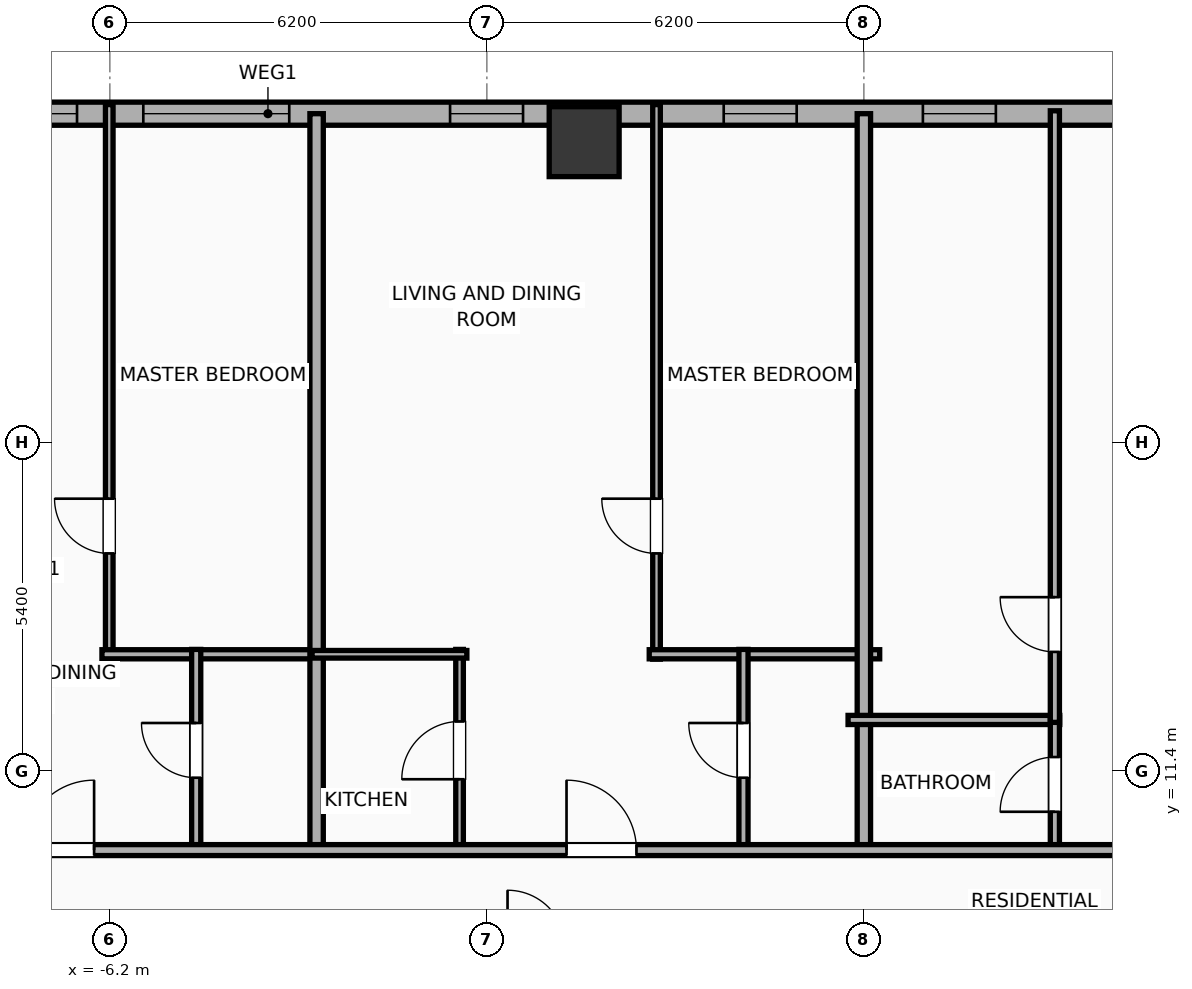
"""IFC4 building model, lengths in metres.
Left out: names, types, materials, properties, quantities, classifications, styles, units other than length and angle.
Written with IfcOpenShell. Run it as: python <this file> out.ifc"""

import sys

from ifc_helpers import new_model, si_unit, direction, frame, frame_2d, origin, origin_2d, place, context, subcontext, project, spatial, rectangle, hollow_rectangle, extrude, element, fill, save


model = new_model("IFC4")
c1 = context("Model", 3, precision=1e-05, world=origin(), true_north=direction((0.0, 1.0)))
c2 = subcontext(c1, "Body", "Model", "MODEL_VIEW")
j1 = project(units=[si_unit("LENGTHUNIT", "METRE"), si_unit("PLANEANGLEUNIT", "RADIAN")], contexts=[c1])
p1 = place(None, origin())
s1 = spatial("IfcSite", under=j1, at=p1, CompositionType="ELEMENT")
p2 = place(p1, origin())
s2 = spatial("IfcBuilding", under=s1, at=p2, CompositionType="ELEMENT")
p3 = place(p2, frame((0.0, 0.0, 33.8)))
s3 = spatial("IfcBuildingStorey", under=s2, at=p3, CompositionType="ELEMENT", Elevation=33.8)
p4 = place(p3, frame((1.6, 21.75, 0.0), z_axis=(0.0, 0.0, 1.0), x_axis=(1.0, 0.0, 0.0)))
e1 = element("IfcColumn", 1, at=p4, inside=s3, PredefinedType="COLUMN", context=c2, shape_type="SweptSolid", body=[
    extrude(hollow_rectangle(XDim=1.15, YDim=1.15, WallThickness=0.04, at=origin_2d()), origin(), (0.0, 0.0, 1.0), 3.9),
])
p5 = place(p3, frame((-29.581, 22.21, 0.0), z_axis=(0.0, 0.0, 1.0), x_axis=(1.0, 0.0, 0.0)))
e2 = element("IfcWall", 2, at=p5, inside=s3, PredefinedType="ELEMENTEDWALL", context=c2, shape_type="SweptSolid", body=[
    extrude(rectangle(XDim=51.963, YDim=0.38, at=frame_2d((25.981, 0.0))), origin(), (0.0, 0.0, 1.0), 3.65),
])
p6 = place(p5, frame((5.81, 0.0, 0.75)))
e3 = element("IfcOpeningElement", 3, at=p6, cuts=e2, PredefinedType="OPENING", context=c2, shape_type="SweptSolid", body=[
    extrude(rectangle(XDim=2.4, YDim=2.1, at=frame_2d((1.2, 1.05))), frame((0.0, 0.2, 0.0), z_axis=(0.0, -1.0, 0.0), x_axis=(1.0, 0.0, 0.0)), (0.0, 0.0, 1.0), 0.4),
])
p7 = place(p5, frame((23.931, 0.0, 0.75)))
e4 = element("IfcOpeningElement", 4, at=p7, cuts=e2, PredefinedType="OPENING", context=c2, shape_type="SweptSolid", body=[
    extrude(rectangle(XDim=2.4, YDim=2.1, at=frame_2d((1.2, 1.05))), frame((0.0, 0.2, 0.0), z_axis=(0.0, -1.0, 0.0), x_axis=(1.0, 0.0, 0.0)), (0.0, 0.0, 1.0), 0.4),
])
p8 = place(p5, frame((3.056, 0.0, 0.75)))
e5 = element("IfcOpeningElement", 5, at=p8, cuts=e2, PredefinedType="OPENING", context=c2, shape_type="SweptSolid", body=[
    extrude(rectangle(XDim=1.2, YDim=2.05, at=frame_2d((0.6, 1.025))), frame((0.0, 0.2, 0.0), z_axis=(0.0, -1.0, 0.0), x_axis=(1.0, 0.0, 0.0)), (0.0, 0.0, 1.0), 0.4),
])
p9 = place(p5, frame((11.127, 0.0, 0.75)))
e6 = element("IfcOpeningElement", 6, at=p9, cuts=e2, PredefinedType="OPENING", context=c2, shape_type="SweptSolid", body=[
    extrude(rectangle(XDim=0.52, YDim=2.05, at=frame_2d((0.26, 1.025))), frame((0.0, 0.2, 0.0), z_axis=(0.0, -1.0, 0.0), x_axis=(1.0, 0.0, 0.0)), (0.0, 0.0, 1.0), 0.4),
])
p10 = place(p5, frame((14.327, 0.0, 0.75)))
e7 = element("IfcOpeningElement", 7, at=p10, cuts=e2, PredefinedType="OPENING", context=c2, shape_type="SweptSolid", body=[
    extrude(rectangle(XDim=1.2, YDim=2.05, at=frame_2d((0.6, 1.025))), frame((0.0, 0.2, 0.0), z_axis=(0.0, -1.0, 0.0), x_axis=(1.0, 0.0, 0.0)), (0.0, 0.0, 1.0), 0.4),
])
p11 = place(p5, frame((21.641, 0.0, 0.75)))
e8 = element("IfcOpeningElement", 8, at=p11, cuts=e2, PredefinedType="OPENING", context=c2, shape_type="SweptSolid", body=[
    extrude(rectangle(XDim=1.2, YDim=2.05, at=frame_2d((0.6, 1.025))), frame((0.0, 0.2, 0.0), z_axis=(0.0, -1.0, 0.0), x_axis=(1.0, 0.0, 0.0)), (0.0, 0.0, 1.0), 0.4),
])
p12 = place(p5, frame((18.486, 0.0, 0.75)))
e9 = element("IfcOpeningElement", 9, at=p12, cuts=e2, PredefinedType="OPENING", context=c2, shape_type="SweptSolid", body=[
    extrude(rectangle(XDim=1.2, YDim=2.05, at=frame_2d((0.6, 1.025))), frame((0.0, 0.2, 0.0), z_axis=(0.0, -1.0, 0.0), x_axis=(1.0, 0.0, 0.0)), (0.0, 0.0, 1.0), 0.4),
])
p13 = place(p5, frame((28.976, 0.0, 0.75)))
e10 = element("IfcOpeningElement", 10, at=p13, cuts=e2, PredefinedType="OPENING", context=c2, shape_type="SweptSolid", body=[
    extrude(rectangle(XDim=1.2, YDim=2.05, at=frame_2d((0.6, 1.025))), frame((0.0, 0.2, 0.0), z_axis=(0.0, -1.0, 0.0), x_axis=(1.0, 0.0, 0.0)), (0.0, 0.0, 1.0), 0.4),
])
p14 = place(p5, frame((33.476, 0.0, 0.75)))
e11 = element("IfcOpeningElement", 11, at=p14, cuts=e2, PredefinedType="OPENING", context=c2, shape_type="SweptSolid", body=[
    extrude(rectangle(XDim=1.2, YDim=2.05, at=frame_2d((0.6, 1.025))), frame((0.0, 0.2, 0.0), z_axis=(0.0, -1.0, 0.0), x_axis=(1.0, 0.0, 0.0)), (0.0, 0.0, 1.0), 0.4),
])
p15 = place(p5, frame((36.752, 0.0, 0.75)))
e12 = element("IfcOpeningElement", 12, at=p15, cuts=e2, PredefinedType="OPENING", context=c2, shape_type="SweptSolid", body=[
    extrude(rectangle(XDim=1.2, YDim=2.05, at=frame_2d((0.6, 1.025))), frame((0.0, 0.2, 0.0), z_axis=(0.0, -1.0, 0.0), x_axis=(1.0, 0.0, 0.0)), (0.0, 0.0, 1.0), 0.4),
])
p16 = place(p5, frame((42.452, 0.0, 0.75)))
e13 = element("IfcOpeningElement", 13, at=p16, cuts=e2, PredefinedType="OPENING", context=c2, shape_type="SweptSolid", body=[
    extrude(rectangle(XDim=1.2, YDim=2.05, at=frame_2d((0.6, 1.025))), frame((0.0, 0.2, 0.0), z_axis=(0.0, -1.0, 0.0), x_axis=(1.0, 0.0, 0.0)), (0.0, 0.0, 1.0), 0.4),
])
p17 = place(p5, frame((45.831, 0.0, 0.75)))
e14 = element("IfcOpeningElement", 14, at=p17, cuts=e2, PredefinedType="OPENING", context=c2, shape_type="SweptSolid", body=[
    extrude(rectangle(XDim=1.2, YDim=2.05, at=frame_2d((0.6, 1.025))), frame((0.0, 0.2, 0.0), z_axis=(0.0, -1.0, 0.0), x_axis=(1.0, 0.0, 0.0)), (0.0, 0.0, 1.0), 0.4),
])
p18 = place(p5, frame((48.585, 0.0, 0.75)))
e15 = element("IfcOpeningElement", 15, at=p18, cuts=e2, PredefinedType="OPENING", context=c2, shape_type="SweptSolid", body=[
    extrude(rectangle(XDim=1.2, YDim=2.05, at=frame_2d((0.6, 1.025))), frame((0.0, 0.2, 0.0), z_axis=(0.0, -1.0, 0.0), x_axis=(1.0, 0.0, 0.0)), (0.0, 0.0, 1.0), 0.4),
])
p19 = place(p5, frame((50.421, 0.0, 0.75)))
e16 = element("IfcOpeningElement", 16, at=p19, cuts=e2, PredefinedType="OPENING", context=c2, shape_type="SweptSolid", body=[
    extrude(rectangle(XDim=0.52, YDim=2.05, at=frame_2d((0.26, 1.025))), frame((0.0, 0.2, 0.0), z_axis=(0.0, -1.0, 0.0), x_axis=(1.0, 0.0, 0.0)), (0.0, 0.0, 1.0), 0.4),
])
p20 = place(p3, frame((-6.21, 13.24, 0.0), z_axis=(0.0, 0.0, 1.0), x_axis=(0.0, 1.0, 0.0)))
e17 = element("IfcWall", 17, at=p20, inside=s3, PredefinedType="PARTITIONING", context=c2, shape_type="SweptSolid", body=[
    extrude(rectangle(XDim=9.12, YDim=0.125, at=frame_2d((4.56, 0.0))), origin(), (0.0, 0.0, 1.0), 3.65),
])
p21 = place(p20, frame((1.739, 0.0, 0.0)))
e18 = element("IfcOpeningElement", 18, at=p21, cuts=e17, PredefinedType="OPENING", context=c2, shape_type="SweptSolid", body=[
    extrude(rectangle(XDim=0.9, YDim=2.05, at=frame_2d((0.45, 1.025))), frame((0.0, 0.073, 0.0), z_axis=(0.0, -1.0, 0.0), x_axis=(1.0, 0.0, 0.0)), (0.0, 0.0, 1.0), 0.145),
])
p22 = place(p3, frame((-6.33, 13.32, 0.0), z_axis=(0.0, 0.0, 1.0), x_axis=(1.0, 0.0, 0.0)))
e19 = element("IfcWall", 19, at=p22, inside=s3, PredefinedType="PLUMBINGWALL", context=c2, shape_type="SweptSolid", body=[
    extrude(rectangle(XDim=3.605, YDim=0.15, at=frame_2d((1.802, 0.0))), origin(), (0.0, 0.0, 1.0), 3.65),
])
p23 = place(p3, frame((-4.78, 10.08, 0.0), z_axis=(0.0, 0.0, 1.0), x_axis=(0.0, 1.0, 0.0)))
e20 = element("IfcWall", 20, at=p23, inside=s3, PredefinedType="PLUMBINGWALL", context=c2, shape_type="SweptSolid", body=[
    extrude(rectangle(XDim=3.32, YDim=0.15, at=frame_2d((1.66, 0.0))), origin(), (0.0, 0.0, 1.0), 3.65),
])
p24 = place(p23, frame((1.21, 0.0, 0.0)))
e21 = element("IfcOpeningElement", 21, at=p24, cuts=e20, PredefinedType="OPENING", context=c2, shape_type="SweptSolid", body=[
    extrude(rectangle(XDim=0.9, YDim=2.05, at=frame_2d((0.45, 1.025))), frame((0.0, 0.085, 0.0), z_axis=(0.0, -1.0, 0.0), x_axis=(1.0, 0.0, 0.0)), (0.0, 0.0, 1.0), 0.17),
])
p25 = place(p3, frame((-2.8, 10.02, 0.0), z_axis=(0.0, 0.0, 1.0), x_axis=(0.0, 1.0, 0.0)))
e22 = element("IfcWall", 22, at=p25, inside=s3, PredefinedType="PARTITIONING", context=c2, shape_type="SweptSolid", body=[
    extrude(rectangle(XDim=12.19, YDim=0.22, at=frame_2d((6.095, 0.0))), origin(), (0.0, 0.0, 1.0), 3.65),
])
p26 = place(p3, frame((2.79, 13.24, 0.0), z_axis=(0.0, 0.0, 1.0), x_axis=(0.0, 1.0, 0.0)))
e23 = element("IfcWall", 23, at=p26, inside=s3, PredefinedType="PARTITIONING", context=c2, shape_type="SweptSolid", body=[
    extrude(rectangle(XDim=9.12, YDim=0.125, at=frame_2d((4.56, 0.0))), origin(), (0.0, 0.0, 1.0), 2.94),
])
p27 = place(p26, frame((1.739, 0.0, 0.0)))
e24 = element("IfcOpeningElement", 24, at=p27, cuts=e23, PredefinedType="OPENING", context=c2, shape_type="SweptSolid", body=[
    extrude(rectangle(XDim=0.9, YDim=2.05, at=frame_2d((0.45, 1.025))), frame((0.0, 0.073, 0.0), z_axis=(0.0, -1.0, 0.0), x_axis=(1.0, 0.0, 0.0)), (0.0, 0.0, 1.0), 0.145),
])
p28 = place(p3, frame((2.67, 13.32, 0.0), z_axis=(0.0, 0.0, 1.0), x_axis=(1.0, 0.0, 0.0)))
e25 = element("IfcWall", 25, at=p28, inside=s3, PredefinedType="PLUMBINGWALL", context=c2, shape_type="SweptSolid", body=[
    extrude(rectangle(XDim=3.79, YDim=0.15, at=frame_2d((1.895, 0.0))), origin(), (0.0, 0.0, 1.0), 3.65),
])
p29 = place(p3, frame((-0.449, 10.08, 0.0), z_axis=(0.0, 0.0, 1.0), x_axis=(0.0, 1.0, 0.0)))
e26 = element("IfcWall", 26, at=p29, inside=s3, PredefinedType="PARTITIONING", context=c2, shape_type="SweptSolid", body=[
    extrude(rectangle(XDim=3.32, YDim=0.125, at=frame_2d((1.66, 0.0))), origin(), (0.0, 0.0, 1.0), 3.65),
])
p30 = place(p29, frame((1.185, 0.0, 0.0)))
e27 = element("IfcOpeningElement", 27, at=p30, cuts=e26, PredefinedType="OPENING", context=c2, shape_type="SweptSolid", body=[
    extrude(rectangle(XDim=0.95, YDim=2.05, at=frame_2d((0.475, 1.025))), frame((0.0, 0.073, 0.0), z_axis=(0.0, -1.0, 0.0), x_axis=(1.0, 0.0, 0.0)), (0.0, 0.0, 1.0), 0.145),
])
p31 = place(p3, frame((-2.875, 13.32, 0.0), z_axis=(0.0, 0.0, 1.0), x_axis=(1.0, 0.0, 0.0)))
e28 = element("IfcWall", 28, at=p31, inside=s3, PredefinedType="PARTITIONING", context=c2, shape_type="SweptSolid", body=[
    extrude(rectangle(XDim=2.546, YDim=0.125, at=frame_2d((1.273, 0.0))), origin(), (0.0, 0.0, 1.0), 3.65),
])
p32 = place(p3, frame((4.22, 10.08, 0.0), z_axis=(0.0, 0.0, 1.0), x_axis=(0.0, 1.0, 0.0)))
e29 = element("IfcWall", 29, at=p32, inside=s3, PredefinedType="PLUMBINGWALL", context=c2, shape_type="SweptSolid", body=[
    extrude(rectangle(XDim=3.32, YDim=0.15, at=frame_2d((1.66, 0.0))), origin(), (0.0, 0.0, 1.0), 3.65),
])
p33 = place(p32, frame((1.21, 0.0, 0.0)))
e30 = element("IfcOpeningElement", 30, at=p33, cuts=e29, PredefinedType="OPENING", context=c2, shape_type="SweptSolid", body=[
    extrude(rectangle(XDim=0.9, YDim=2.05, at=frame_2d((0.45, 1.025))), frame((0.0, 0.085, 0.0), z_axis=(0.0, -1.0, 0.0), x_axis=(1.0, 0.0, 0.0)), (0.0, 0.0, 1.0), 0.17),
])
p34 = place(p3, frame((6.2, 10.02, 0.0), z_axis=(0.0, 0.0, 1.0), x_axis=(0.0, 1.0, 0.0)))
e31 = element("IfcWall", 31, at=p34, inside=s3, PredefinedType="PARTITIONING", context=c2, shape_type="SweptSolid", body=[
    extrude(rectangle(XDim=12.19, YDim=0.22, at=frame_2d((6.095, 0.0))), origin(), (0.0, 0.0, 1.0), 3.65),
])
p35 = place(p3, frame((5.94, 12.24, 0.0), z_axis=(0.0, 0.0, 1.0), x_axis=(1.0, 0.0, 0.0)))
e32 = element("IfcWall", 32, at=p35, inside=s3, PredefinedType="PLUMBINGWALL", context=c2, shape_type="SweptSolid", body=[
    extrude(rectangle(XDim=3.481, YDim=0.15, at=frame_2d((1.74, 0.0))), origin(), (0.0, 0.0, 1.0), 3.65),
])
p36 = place(p3, frame((9.341, 10.08, 0.0), z_axis=(0.0, 0.0, 1.0), x_axis=(0.0, 1.0, 0.0)))
e33 = element("IfcWall", 33, at=p36, inside=s3, PredefinedType="PLUMBINGWALL", context=c2, shape_type="SweptSolid", body=[
    extrude(rectangle(XDim=2.2, YDim=0.15, at=frame_2d((1.1, 0.0))), origin(), (0.0, 0.0, 1.0), 3.65),
])
p37 = place(p36, frame((0.65, 0.0, 0.0)))
e34 = element("IfcOpeningElement", 34, at=p37, cuts=e33, PredefinedType="OPENING", context=c2, shape_type="SweptSolid", body=[
    extrude(rectangle(XDim=0.9, YDim=2.05, at=frame_2d((0.45, 1.025))), frame((0.0, 0.085, 0.0), z_axis=(0.0, -1.0, 0.0), x_axis=(1.0, 0.0, 0.0)), (0.0, 0.0, 1.0), 0.17),
])
p38 = place(p3, frame((9.341, 12.2, 0.0), z_axis=(0.0, 0.0, 1.0), x_axis=(0.0, 1.0, 0.0)))
e35 = element("IfcWall", 35, at=p38, inside=s3, PredefinedType="PLUMBINGWALL", context=c2, shape_type="SweptSolid", body=[
    extrude(rectangle(XDim=10.058, YDim=0.15, at=frame_2d((5.029, 0.0))), origin(), (0.0, 0.0, 1.0), 3.65),
])
p39 = place(p38, frame((1.159, 0.0, 0.0)))
e36 = element("IfcOpeningElement", 36, at=p39, cuts=e35, PredefinedType="OPENING", context=c2, shape_type="SweptSolid", body=[
    extrude(rectangle(XDim=0.9, YDim=2.05, at=frame_2d((0.45, 1.025))), frame((0.0, 0.085, 0.0), z_axis=(0.0, -1.0, 0.0), x_axis=(1.0, 0.0, 0.0)), (0.0, 0.0, 1.0), 0.17),
])
p40 = place(p3, frame((-33.41, 10.1, 0.0), z_axis=(0.0, 0.0, 1.0), x_axis=(1.0, 0.0, 0.0)))
e37 = element("IfcWall", 37, at=p40, inside=s3, PredefinedType="PARTITIONING", context=c2, shape_type="SweptSolid", body=[
    extrude(rectangle(XDim=59.62, YDim=0.18, at=frame_2d((29.81, 0.0))), origin(), (0.0, 0.0, 1.0), 3.65),
])
p41 = place(p40, frame((2.793, 0.0, 0.0)))
e38 = element("IfcOpeningElement", 38, at=p41, cuts=e37, PredefinedType="OPENING", context=c2, shape_type="SweptSolid", body=[
    extrude(rectangle(XDim=0.9, YDim=2.05, at=frame_2d((0.45, 1.025))), frame((0.0, 0.1, 0.0), z_axis=(0.0, -1.0, 0.0), x_axis=(1.0, 0.0, 0.0)), (0.0, 0.0, 1.0), 0.2),
])
p42 = place(p40, frame((10.037, 0.0, 0.0)))
e39 = element("IfcOpeningElement", 39, at=p42, cuts=e37, PredefinedType="OPENING", context=c2, shape_type="SweptSolid", body=[
    extrude(rectangle(XDim=1.15, YDim=2.05, at=frame_2d((0.575, 1.025))), frame((0.0, 0.1, 0.0), z_axis=(0.0, -1.0, 0.0), x_axis=(1.0, 0.0, 0.0)), (0.0, 0.0, 1.0), 0.2),
])
p43 = place(p40, frame((16.882, 0.0, 0.0)))
e40 = element("IfcOpeningElement", 40, at=p43, cuts=e37, PredefinedType="OPENING", context=c2, shape_type="SweptSolid", body=[
    extrude(rectangle(XDim=1.15, YDim=2.05, at=frame_2d((0.575, 1.025))), frame((0.0, 0.1, 0.0), z_axis=(0.0, -1.0, 0.0), x_axis=(1.0, 0.0, 0.0)), (0.0, 0.0, 1.0), 0.2),
])
p44 = place(p40, frame((25.801, 0.0, 0.0)))
e41 = element("IfcOpeningElement", 41, at=p44, cuts=e37, PredefinedType="OPENING", context=c2, shape_type="SweptSolid", body=[
    extrude(rectangle(XDim=1.15, YDim=2.05, at=frame_2d((0.575, 1.025))), frame((0.0, 0.1, 0.0), z_axis=(0.0, -1.0, 0.0), x_axis=(1.0, 0.0, 0.0)), (0.0, 0.0, 1.0), 0.2),
])
p45 = place(p40, frame((34.72, 0.0, 0.0)))
e42 = element("IfcOpeningElement", 42, at=p45, cuts=e37, PredefinedType="OPENING", context=c2, shape_type="SweptSolid", body=[
    extrude(rectangle(XDim=1.15, YDim=2.05, at=frame_2d((0.575, 1.025))), frame((0.0, 0.1, 0.0), z_axis=(0.0, -1.0, 0.0), x_axis=(1.0, 0.0, 0.0)), (0.0, 0.0, 1.0), 0.2),
])
p46 = place(p40, frame((43.771, 0.0, 0.0)))
e43 = element("IfcOpeningElement", 43, at=p46, cuts=e37, PredefinedType="OPENING", context=c2, shape_type="SweptSolid", body=[
    extrude(rectangle(XDim=1.15, YDim=2.05, at=frame_2d((0.575, 1.025))), frame((0.0, 0.1, 0.0), z_axis=(0.0, -1.0, 0.0), x_axis=(1.0, 0.0, 0.0)), (0.0, 0.0, 1.0), 0.2),
])
p47 = place(p40, frame((49.715, 0.0, 0.0)))
e44 = element("IfcOpeningElement", 44, at=p47, cuts=e37, PredefinedType="OPENING", context=c2, shape_type="SweptSolid", body=[
    extrude(rectangle(XDim=1.15, YDim=2.05, at=frame_2d((0.575, 1.025))), frame((0.0, 0.1, 0.0), z_axis=(0.0, -1.0, 0.0), x_axis=(1.0, 0.0, 0.0)), (0.0, 0.0, 1.0), 0.2),
])
p48 = place(p40, frame((56.654, 0.0, 0.0)))
e45 = element("IfcOpeningElement", 45, at=p48, cuts=e37, PredefinedType="OPENING", context=c2, shape_type="SweptSolid", body=[
    extrude(rectangle(XDim=0.9, YDim=2.05, at=frame_2d((0.45, 1.025))), frame((0.0, 0.1, 0.0), z_axis=(0.0, -1.0, 0.0), x_axis=(1.0, 0.0, 0.0)), (0.0, 0.0, 1.0), 0.2),
])
p49 = place(p7, origin())
e46 = element("IfcWindow", 46, at=p49, inside=s3, PartitioningType="SINGLE_PANEL", PredefinedType="WINDOW", context=c2, shape_type="SweptSolid", body=[
    extrude(rectangle(XDim=2.4, YDim=2.1, at=frame_2d((1.2, 1.05))), frame((0.0, 0.03, 0.0), z_axis=(0.0, -1.0, 0.0), x_axis=(1.0, 0.0, 0.0)), (0.0, 0.0, 1.0), 0.06),
])
fill(e4, e46)
p50 = place(p11, origin())
e47 = element("IfcWindow", 47, at=p50, inside=s3, PartitioningType="SINGLE_PANEL", PredefinedType="WINDOW", context=c2, shape_type="SweptSolid", body=[
    extrude(rectangle(XDim=1.2, YDim=2.05, at=frame_2d((0.6, 1.025))), frame((0.0, 0.03, 0.0), z_axis=(0.0, -1.0, 0.0), x_axis=(1.0, 0.0, 0.0)), (0.0, 0.0, 1.0), 0.06),
])
fill(e8, e47)
p51 = place(p13, origin())
e48 = element("IfcWindow", 48, at=p51, inside=s3, PartitioningType="SINGLE_PANEL", PredefinedType="WINDOW", context=c2, shape_type="SweptSolid", body=[
    extrude(rectangle(XDim=1.2, YDim=2.05, at=frame_2d((0.6, 1.025))), frame((0.0, 0.03, 0.0), z_axis=(0.0, -1.0, 0.0), x_axis=(1.0, 0.0, 0.0)), (0.0, 0.0, 1.0), 0.06),
])
fill(e10, e48)
p52 = place(p14, origin())
e49 = element("IfcWindow", 49, at=p52, inside=s3, PartitioningType="SINGLE_PANEL", PredefinedType="WINDOW", context=c2, shape_type="SweptSolid", body=[
    extrude(rectangle(XDim=1.2, YDim=2.05, at=frame_2d((0.6, 1.025))), frame((0.0, 0.03, 0.0), z_axis=(0.0, -1.0, 0.0), x_axis=(1.0, 0.0, 0.0)), (0.0, 0.0, 1.0), 0.06),
])
fill(e11, e49)
p53 = place(p15, origin())
e50 = element("IfcWindow", 50, at=p53, inside=s3, PartitioningType="SINGLE_PANEL", PredefinedType="WINDOW", context=c2, shape_type="SweptSolid", body=[
    extrude(rectangle(XDim=1.2, YDim=2.05, at=frame_2d((0.6, 1.025))), frame((0.0, 0.03, 0.0), z_axis=(0.0, -1.0, 0.0), x_axis=(1.0, 0.0, 0.0)), (0.0, 0.0, 1.0), 0.06),
])
fill(e12, e50)
p54 = place(p21, origin())
e51 = element("IfcDoor", 51, at=p54, inside=s3, OperationType="SINGLE_SWING_RIGHT", PredefinedType="DOOR", context=c2, shape_type="SweptSolid", body=[
    extrude(rectangle(XDim=0.9, YDim=2.05, at=frame_2d((0.45, 1.025))), frame((0.0, 0.025, 0.0), z_axis=(0.0, -1.0, 0.0), x_axis=(1.0, 0.0, 0.0)), (0.0, 0.0, 1.0), 0.05),
])
fill(e18, e51)
p55 = place(p24, origin())
e52 = element("IfcDoor", 52, at=p55, inside=s3, OperationType="SINGLE_SWING_RIGHT", PredefinedType="DOOR", context=c2, shape_type="SweptSolid", body=[
    extrude(rectangle(XDim=0.9, YDim=2.05, at=frame_2d((0.45, 1.025))), frame((0.0, 0.025, 0.0), z_axis=(0.0, -1.0, 0.0), x_axis=(1.0, 0.0, 0.0)), (0.0, 0.0, 1.0), 0.05),
])
fill(e21, e52)
p56 = place(p27, origin())
e53 = element("IfcDoor", 53, at=p56, inside=s3, OperationType="SINGLE_SWING_RIGHT", PredefinedType="DOOR", context=c2, shape_type="SweptSolid", body=[
    extrude(rectangle(XDim=0.9, YDim=2.05, at=frame_2d((0.45, 1.025))), frame((0.0, 0.025, 0.0), z_axis=(0.0, -1.0, 0.0), x_axis=(1.0, 0.0, 0.0)), (0.0, 0.0, 1.0), 0.05),
])
fill(e24, e53)
p57 = place(p30, origin())
e54 = element("IfcDoor", 54, at=p57, inside=s3, OperationType="SINGLE_SWING_LEFT", PredefinedType="DOOR", context=c2, shape_type="SweptSolid", body=[
    extrude(rectangle(XDim=0.95, YDim=2.05, at=frame_2d((0.475, 1.025))), frame((0.0, 0.025, 0.0), z_axis=(0.0, -1.0, 0.0), x_axis=(1.0, 0.0, 0.0)), (0.0, 0.0, 1.0), 0.05),
])
fill(e27, e54)
p58 = place(p33, origin())
e55 = element("IfcDoor", 55, at=p58, inside=s3, OperationType="SINGLE_SWING_RIGHT", PredefinedType="DOOR", context=c2, shape_type="SweptSolid", body=[
    extrude(rectangle(XDim=0.9, YDim=2.05, at=frame_2d((0.45, 1.025))), frame((0.0, 0.025, 0.0), z_axis=(0.0, -1.0, 0.0), x_axis=(1.0, 0.0, 0.0)), (0.0, 0.0, 1.0), 0.05),
])
fill(e30, e55)
p59 = place(p37, origin())
e56 = element("IfcDoor", 56, at=p59, inside=s3, OperationType="SINGLE_SWING_LEFT", PredefinedType="DOOR", context=c2, shape_type="SweptSolid", body=[
    extrude(rectangle(XDim=0.9, YDim=2.05, at=frame_2d((0.45, 1.025))), frame((0.0, 0.025, 0.0), z_axis=(0.0, -1.0, 0.0), x_axis=(1.0, 0.0, 0.0)), (0.0, 0.0, 1.0), 0.05),
])
fill(e34, e56)
p60 = place(p39, origin())
e57 = element("IfcDoor", 57, at=p60, inside=s3, OperationType="SINGLE_SWING_RIGHT", PredefinedType="DOOR", context=c2, shape_type="SweptSolid", body=[
    extrude(rectangle(XDim=0.9, YDim=2.05, at=frame_2d((0.45, 1.025))), frame((0.0, 0.025, 0.0), z_axis=(0.0, -1.0, 0.0), x_axis=(1.0, 0.0, 0.0)), (0.0, 0.0, 1.0), 0.05),
])
fill(e36, e57)
p61 = place(p44, origin())
e58 = element("IfcDoor", 58, at=p61, inside=s3, OperationType="SINGLE_SWING_RIGHT", PredefinedType="DOOR", context=c2, shape_type="SweptSolid", body=[
    extrude(rectangle(XDim=1.15, YDim=2.05, at=frame_2d((0.575, 1.025))), frame((0.0, 0.025, 0.0), z_axis=(0.0, -1.0, 0.0), x_axis=(1.0, 0.0, 0.0)), (0.0, 0.0, 1.0), 0.05),
])
fill(e41, e58)
p62 = place(p45, origin())
e59 = element("IfcDoor", 59, at=p62, inside=s3, OperationType="SINGLE_SWING_LEFT", PredefinedType="DOOR", context=c2, shape_type="SweptSolid", body=[
    extrude(rectangle(XDim=1.15, YDim=2.05, at=frame_2d((0.575, 1.025))), frame((0.0, 0.025, 0.0), z_axis=(0.0, -1.0, 0.0), x_axis=(1.0, 0.0, 0.0)), (0.0, 0.0, 1.0), 0.05),
])
fill(e42, e59)
save(model, sys.argv[1])
